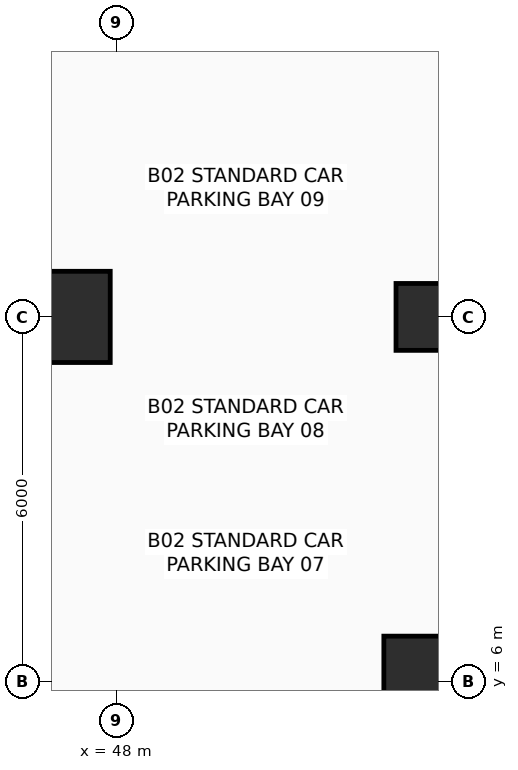
"""IFC4 building model, lengths in metres.
Left out: names, types, materials, properties, quantities, classifications, styles, units other than length and angle.
Written with IfcOpenShell. Run it as: python <this file> out.ifc"""

import sys

from ifc_helpers import new_model, si_unit, direction, frame, origin, origin_2d, place, context, subcontext, project, spatial, rectangle, extrude, element, save


model = new_model("IFC4")
c1 = context("Model", 3, precision=1e-05, world=origin(), true_north=direction((0.0, 1.0)))
c2 = subcontext(c1, "Body", "Model", "MODEL_VIEW")
j1 = project(units=[si_unit("LENGTHUNIT", "METRE"), si_unit("PLANEANGLEUNIT", "RADIAN")], contexts=[c1])
p1 = place(None, origin())
s1 = spatial("IfcSite", under=j1, at=p1, CompositionType="ELEMENT")
p2 = place(p1, origin())
s2 = spatial("IfcBuilding", under=s1, at=p2, CompositionType="ELEMENT")
p3 = place(p2, frame((0.0, 0.0, -9.6)))
s3 = spatial("IfcBuildingStorey", under=s2, at=p3, CompositionType="ELEMENT", Elevation=-9.6)
for number, where, z_axis, x_axis in (
    (1, (47.15, 12.0, 0.0), (0.0, 0.0, 1.0), (1.0, 0.0, 0.0)),
    (2, (53.15, 6.0, 0.0), (0.0, 0.0, 1.0), (1.0, 0.0, 0.0)),
):
    element("IfcColumn", number, at=place(p3, frame(where, z_axis=z_axis, x_axis=x_axis)), inside=s3, PredefinedType="COLUMN", context=c2, shape_type="SweptSolid", body=[
        extrude(rectangle(XDim=1.5, YDim=1.5, at=origin_2d()), origin(), (0.0, 0.0, 1.0), 4.8),
    ])
p4 = place(p3, frame((53.15, 12.0, 0.0), z_axis=(0.0, 0.0, 1.0), x_axis=(1.0, 0.0, 0.0)))
e3 = element("IfcColumn", 3, at=p4, inside=s3, PredefinedType="COLUMN", context=c2, shape_type="SweptSolid", body=[
    extrude(rectangle(XDim=1.1, YDim=1.1, at=origin_2d()), origin(), (0.0, 0.0, 1.0), 4.8),
])
save(model, sys.argv[1])
